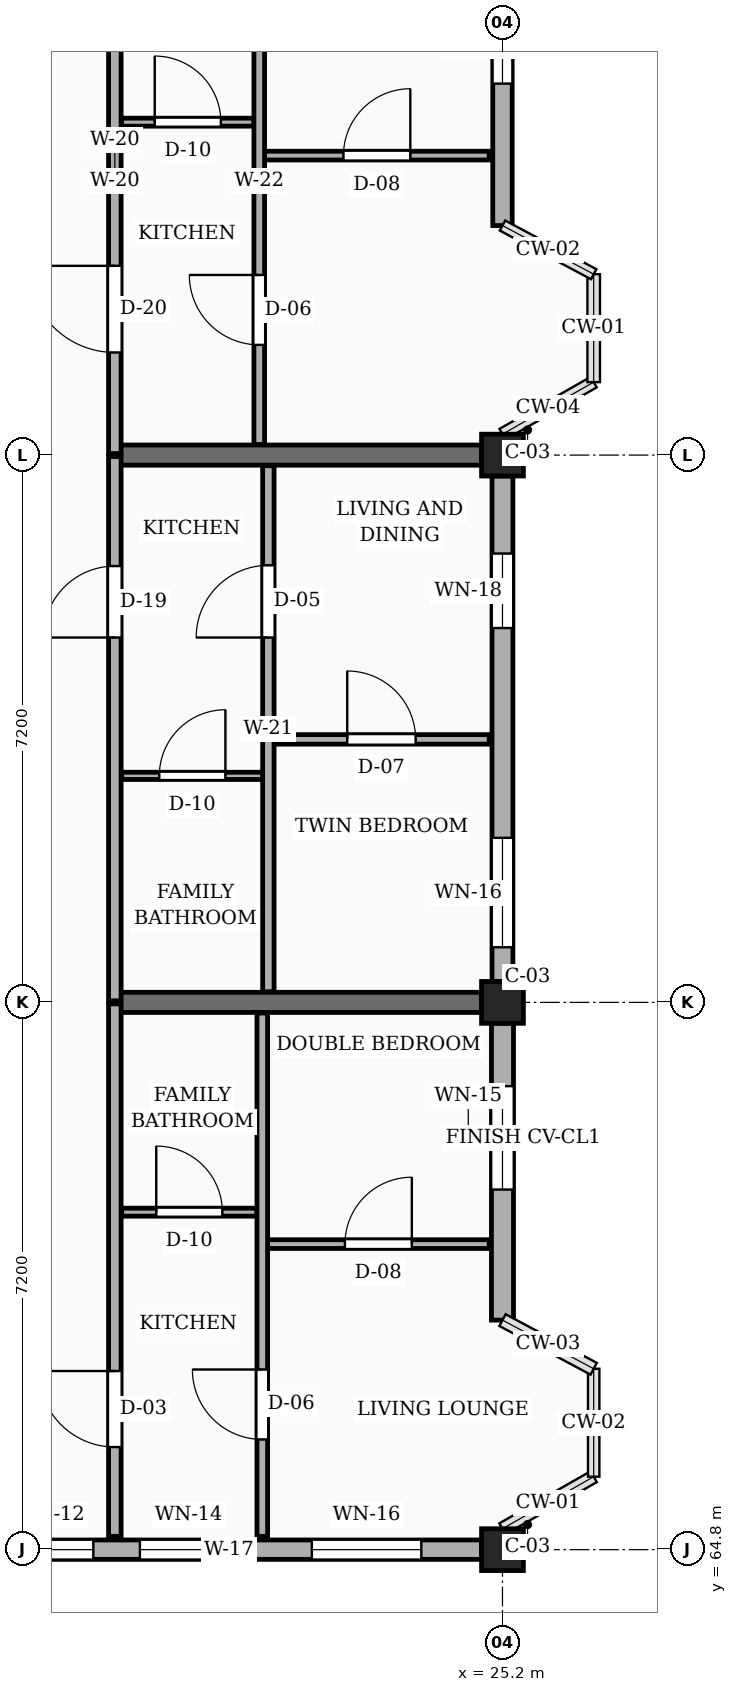
"""IFC4 building model, lengths in metres.
Left out: names, types, materials, properties, quantities, classifications, styles, units other than length and angle.
Written with IfcOpenShell. Run it as: python <this file> out.ifc"""

import sys

from ifc_helpers import new_model, si_unit, direction, frame, frame_2d, origin, origin_2d, place, context, subcontext, project, spatial, rectangle, extrude, element, fill, save


model = new_model("IFC4")
c1 = context("Model", 3, precision=1e-05, world=origin(), true_north=direction((0.0, 1.0)))
c2 = subcontext(c1, "Body", "Model", "MODEL_VIEW")
j1 = project(units=[si_unit("LENGTHUNIT", "METRE"), si_unit("PLANEANGLEUNIT", "RADIAN")], contexts=[c1])
p1 = place(None, origin())
s1 = spatial("IfcSite", under=j1, at=p1, CompositionType="ELEMENT")
p2 = place(p1, origin())
s2 = spatial("IfcBuilding", under=s1, at=p2, CompositionType="ELEMENT")
p3 = place(p2, frame((0.0, 0.0, 10.8)))
s3 = spatial("IfcBuildingStorey", under=s2, at=p3, CompositionType="ELEMENT", Elevation=10.8)
for number, where, z_axis, x_axis in (
    (1, (25.2, 64.8, 0.0), (0.0, 0.0, 1.0), (1.0, 0.0, 0.0)),
    (2, (25.2, 72.0, 0.0), (0.0, 0.0, 1.0), (1.0, 0.0, 0.0)),
    (3, (25.2, 79.2, 0.0), (0.0, 0.0, 1.0), (1.0, 0.0, 0.0)),
):
    element("IfcColumn", number, at=place(p3, frame(where, z_axis=z_axis, x_axis=x_axis)), inside=s3, PredefinedType="COLUMN", context=c2, shape_type="SweptSolid", body=[
        extrude(rectangle(XDim=0.55, YDim=0.55, at=origin_2d()), origin(), (0.0, 0.0, 1.0), 3.15),
    ])
for number, where, z_axis, x_axis in (
    (4, (20.1, 72.0, 0.0), (0.0, 0.0, 1.0), (1.0, 0.0, 0.0)),
    (5, (20.1, 79.2, 0.0), (0.0, 0.0, 1.0), (1.0, 0.0, 0.0)),
):
    element("IfcWall", number, at=place(p3, frame(where, z_axis=z_axis, x_axis=x_axis)), inside=s3, PredefinedType="SOLIDWALL", context=c2, shape_type="SweptSolid", body=[
        extrude(rectangle(XDim=4.825, YDim=0.265, at=frame_2d((2.413, 0.0))), origin(), (0.0, 0.0, 1.0), 2.21),
    ])
p4 = place(p3, frame((18.275, 64.8, 0.0), z_axis=(0.0, 0.0, 1.0), x_axis=(1.0, 0.0, 0.0)))
e6 = element("IfcWall", 6, at=p4, inside=s3, PredefinedType="SOLIDWALL", context=c2, shape_type="SweptSolid", body=[
    extrude(rectangle(XDim=6.65, YDim=0.255, at=frame_2d((3.325, 0.0))), origin(), (0.0, 0.0, 1.0), 2.48),
])
p5 = place(p4, frame((0.423, 0.0, 0.78)))
e7 = element("IfcOpeningElement", 7, at=p5, cuts=e6, PredefinedType="OPENING", context=c2, shape_type="SweptSolid", body=[
    extrude(rectangle(XDim=1.12, YDim=1.26, at=frame_2d((0.56, 0.63))), frame((0.0, 0.137, 0.0), z_axis=(0.0, -1.0, 0.0), x_axis=(1.0, 0.0, 0.0)), (0.0, 0.0, 1.0), 0.275),
])
p6 = place(p4, frame((2.155, 0.0, 0.78)))
e8 = element("IfcOpeningElement", 8, at=p6, cuts=e6, PredefinedType="OPENING", context=c2, shape_type="SweptSolid", body=[
    extrude(rectangle(XDim=1.28, YDim=1.26, at=frame_2d((0.64, 0.63))), frame((0.0, 0.137, 0.0), z_axis=(0.0, -1.0, 0.0), x_axis=(1.0, 0.0, 0.0)), (0.0, 0.0, 1.0), 0.275),
])
p7 = place(p4, frame((4.417, 0.0, 0.78)))
e9 = element("IfcOpeningElement", 9, at=p7, cuts=e6, PredefinedType="OPENING", context=c2, shape_type="SweptSolid", body=[
    extrude(rectangle(XDim=1.44, YDim=1.26, at=frame_2d((0.72, 0.63))), frame((0.0, 0.137, 0.0), z_axis=(0.0, -1.0, 0.0), x_axis=(1.0, 0.0, 0.0)), (0.0, 0.0, 1.0), 0.275),
])
p8 = place(p3, frame((25.2, 67.82, 0.0), z_axis=(0.0, 0.0, 1.0), x_axis=(0.0, 1.0, 0.0)))
e10 = element("IfcWall", 10, at=p8, inside=s3, PredefinedType="SOLIDWALL", context=c2, shape_type="SweptSolid", body=[
    extrude(rectangle(XDim=3.905, YDim=0.29, at=frame_2d((1.953, 0.0))), origin(), (0.0, 0.0, 1.0), 2.48),
])
p9 = place(p8, frame((1.718, 0.0, 0.78)))
e11 = element("IfcOpeningElement", 11, at=p9, cuts=e10, PredefinedType="OPENING", context=c2, shape_type="SweptSolid", body=[
    extrude(rectangle(XDim=1.36, YDim=1.26, at=frame_2d((0.68, 0.63))), frame((0.0, 0.155, 0.0), z_axis=(0.0, -1.0, 0.0), x_axis=(1.0, 0.0, 0.0)), (0.0, 0.0, 1.0), 0.31),
])
p10 = place(p3, frame((25.2, 72.275, 0.0), z_axis=(0.0, 0.0, 1.0), x_axis=(0.0, 1.0, 0.0)))
e12 = element("IfcWall", 12, at=p10, inside=s3, PredefinedType="SOLIDWALL", context=c2, shape_type="SweptSolid", body=[
    extrude(rectangle(XDim=6.65, YDim=0.275, at=frame_2d((3.325, 0.0))), origin(), (0.0, 0.0, 1.0), 2.48),
])
p11 = place(p10, frame((0.45, 0.0, 0.78)))
e13 = element("IfcOpeningElement", 13, at=p11, cuts=e12, PredefinedType="OPENING", context=c2, shape_type="SweptSolid", body=[
    extrude(rectangle(XDim=1.44, YDim=1.26, at=frame_2d((0.72, 0.63))), frame((0.0, 0.147, 0.0), z_axis=(0.0, -1.0, 0.0), x_axis=(1.0, 0.0, 0.0)), (0.0, 0.0, 1.0), 0.295),
])
p12 = place(p10, frame((4.65, 0.0, 0.78)))
e14 = element("IfcOpeningElement", 14, at=p12, cuts=e12, PredefinedType="OPENING", context=c2, shape_type="SweptSolid", body=[
    extrude(rectangle(XDim=0.98, YDim=1.36, at=frame_2d((0.49, 0.68))), frame((0.0, 0.147, 0.0), z_axis=(0.0, -1.0, 0.0), x_axis=(1.0, 0.0, 0.0)), (0.0, 0.0, 1.0), 0.295),
])
p13 = place(p3, frame((25.2, 82.22, 0.0), z_axis=(0.0, 0.0, 1.0), x_axis=(0.0, 1.0, 0.0)))
e15 = element("IfcWall", 15, at=p13, inside=s3, PredefinedType="SOLIDWALL", context=c2, shape_type="SweptSolid", body=[
    extrude(rectangle(XDim=3.905, YDim=0.255, at=frame_2d((1.953, 0.0))), origin(), (0.0, 0.0, 1.0), 2.48),
])
p14 = place(p13, frame((1.867, 0.0, 0.78)))
e16 = element("IfcOpeningElement", 16, at=p14, cuts=e15, PredefinedType="OPENING", context=c2, shape_type="SweptSolid", body=[
    extrude(rectangle(XDim=0.98, YDim=1.36, at=frame_2d((0.49, 0.68))), frame((0.0, 0.137, 0.0), z_axis=(0.0, -1.0, 0.0), x_axis=(1.0, 0.0, 0.0)), (0.0, 0.0, 1.0), 0.275),
])
p15 = place(p3, frame((20.1, 64.975, 0.0), z_axis=(0.0, 0.0, 1.0), x_axis=(0.0, 1.0, 0.0)))
e17 = element("IfcWall", 17, at=p15, inside=s3, PredefinedType="PARTITIONING", context=c2, shape_type="SweptSolid", body=[
    extrude(rectangle(XDim=7.005, YDim=0.165, at=frame_2d((3.502, 0.0))), origin(), (0.0, 0.0, 1.0), 2.345),
])
p16 = place(p15, frame((1.175, 0.0, 0.0)))
e18 = element("IfcOpeningElement", 18, at=p16, cuts=e17, PredefinedType="OPENING", context=c2, shape_type="SweptSolid", body=[
    extrude(rectangle(XDim=1.0, YDim=2.15, at=frame_2d((0.5, 1.075))), frame((0.0, 0.093, 0.0), z_axis=(0.0, -1.0, 0.0), x_axis=(1.0, 0.0, 0.0)), (0.0, 0.0, 1.0), 0.185),
])
p17 = place(p3, frame((20.1, 72.02, 0.0), z_axis=(0.0, 0.0, 1.0), x_axis=(0.0, 1.0, 0.0)))
e19 = element("IfcWall", 19, at=p17, inside=s3, PredefinedType="PARTITIONING", context=c2, shape_type="SweptSolid", body=[
    extrude(rectangle(XDim=7.16, YDim=0.165, at=frame_2d((3.58, 0.0))), origin(), (0.0, 0.0, 1.0), 2.345),
])
p18 = place(p17, frame((4.78, 0.0, 0.0)))
e20 = element("IfcOpeningElement", 20, at=p18, cuts=e19, PredefinedType="OPENING", context=c2, shape_type="SweptSolid", body=[
    extrude(rectangle(XDim=0.94, YDim=2.12, at=frame_2d((0.47, 1.06))), frame((0.0, 0.093, 0.0), z_axis=(0.0, -1.0, 0.0), x_axis=(1.0, 0.0, 0.0)), (0.0, 0.0, 1.0), 0.185),
])
p19 = place(p3, frame((20.1, 79.22, 0.0), z_axis=(0.0, 0.0, 1.0), x_axis=(0.0, 1.0, 0.0)))
e21 = element("IfcWall", 21, at=p19, inside=s3, PredefinedType="PARTITIONING", context=c2, shape_type="SweptSolid", body=[
    extrude(rectangle(XDim=7.16, YDim=0.165, at=frame_2d((3.58, 0.0))), origin(), (0.0, 0.0, 1.0), 2.345),
])
p20 = place(p19, frame((1.33, 0.0, 0.0)))
e22 = element("IfcOpeningElement", 22, at=p20, cuts=e21, PredefinedType="OPENING", context=c2, shape_type="SweptSolid", body=[
    extrude(rectangle(XDim=1.14, YDim=2.18, at=frame_2d((0.57, 1.09))), frame((0.0, 0.093, 0.0), z_axis=(0.0, -1.0, 0.0), x_axis=(1.0, 0.0, 0.0)), (0.0, 0.0, 1.0), 0.185),
])
p21 = place(p3, frame((22.11, 68.82, 0.0), z_axis=(0.0, 0.0, 1.0), x_axis=(1.0, 0.0, 0.0)))
e23 = element("IfcWall", 23, at=p21, inside=s3, PredefinedType="PARTITIONING", context=c2, shape_type="SweptSolid", body=[
    extrude(rectangle(XDim=2.915, YDim=0.115, at=frame_2d((1.458, 0.0))), origin(), (0.0, 0.0, 1.0), 2.345),
])
p22 = place(p21, frame((1.018, 0.0, 0.0)))
e24 = element("IfcOpeningElement", 24, at=p22, cuts=e23, PredefinedType="OPENING", context=c2, shape_type="SweptSolid", body=[
    extrude(rectangle(XDim=0.88, YDim=2.08, at=frame_2d((0.44, 1.04))), frame((0.0, 0.067, 0.0), z_axis=(0.0, -1.0, 0.0), x_axis=(1.0, 0.0, 0.0)), (0.0, 0.0, 1.0), 0.135),
])
p23 = place(p3, frame((20.19, 69.24, 0.0), z_axis=(0.0, 0.0, 1.0), x_axis=(1.0, 0.0, 0.0)))
e25 = element("IfcWall", 25, at=p23, inside=s3, PredefinedType="PARTITIONING", context=c2, shape_type="SweptSolid", body=[
    extrude(rectangle(XDim=1.78, YDim=0.105, at=frame_2d((0.89, 0.0))), origin(), (0.0, 0.0, 1.0), 2.345),
])
p24 = place(p23, frame((0.455, 0.0, 0.0)))
e26 = element("IfcOpeningElement", 26, at=p24, cuts=e25, PredefinedType="OPENING", context=c2, shape_type="SweptSolid", body=[
    extrude(rectangle(XDim=0.87, YDim=2.05, at=frame_2d((0.435, 1.025))), frame((0.0, 0.062, 0.0), z_axis=(0.0, -1.0, 0.0), x_axis=(1.0, 0.0, 0.0)), (0.0, 0.0, 1.0), 0.125),
])
p25 = place(p3, frame((22.04, 64.975, 0.0), z_axis=(0.0, 0.0, 1.0), x_axis=(0.0, 1.0, 0.0)))
e27 = element("IfcWall", 27, at=p25, inside=s3, PredefinedType="PARTITIONING", context=c2, shape_type="SweptSolid", body=[
    extrude(rectangle(XDim=6.885, YDim=0.14, at=frame_2d((3.442, 0.0))), origin(), (0.0, 0.0, 1.0), 2.345),
])
p26 = place(p25, frame((1.275, 0.0, 0.0)))
e28 = element("IfcOpeningElement", 28, at=p26, cuts=e27, PredefinedType="OPENING", context=c2, shape_type="SweptSolid", body=[
    extrude(rectangle(XDim=0.92, YDim=2.1, at=frame_2d((0.46, 1.05))), frame((0.0, 0.08, 0.0), z_axis=(0.0, -1.0, 0.0), x_axis=(1.0, 0.0, 0.0)), (0.0, 0.0, 1.0), 0.16),
])
p27 = place(p3, frame((22.19, 75.46, 0.0), z_axis=(0.0, 0.0, 1.0), x_axis=(1.0, 0.0, 0.0)))
e29 = element("IfcWall", 29, at=p27, inside=s3, PredefinedType="PARTITIONING", context=c2, shape_type="SweptSolid", body=[
    extrude(rectangle(XDim=2.835, YDim=0.125, at=frame_2d((1.417, 0.0))), origin(), (0.0, 0.0, 1.0), 2.345),
])
p28 = place(p27, frame((0.968, 0.0, 0.0)))
e30 = element("IfcOpeningElement", 30, at=p28, cuts=e29, PredefinedType="OPENING", context=c2, shape_type="SweptSolid", body=[
    extrude(rectangle(XDim=0.9, YDim=2.1, at=frame_2d((0.45, 1.05))), frame((0.0, 0.073, 0.0), z_axis=(0.0, -1.0, 0.0), x_axis=(1.0, 0.0, 0.0)), (0.0, 0.0, 1.0), 0.145),
])
p29 = place(p3, frame((20.19, 74.98, 0.0), z_axis=(0.0, 0.0, 1.0), x_axis=(1.0, 0.0, 0.0)))
e31 = element("IfcWall", 31, at=p29, inside=s3, PredefinedType="PARTITIONING", context=c2, shape_type="SweptSolid", body=[
    extrude(rectangle(XDim=1.86, YDim=0.095, at=frame_2d((0.93, 0.0))), origin(), (0.0, 0.0, 1.0), 2.345),
])
p30 = place(p29, frame((0.495, 0.0, 0.0)))
e32 = element("IfcOpeningElement", 32, at=p30, cuts=e31, PredefinedType="OPENING", context=c2, shape_type="SweptSolid", body=[
    extrude(rectangle(XDim=0.87, YDim=2.05, at=frame_2d((0.435, 1.025))), frame((0.0, 0.058, 0.0), z_axis=(0.0, -1.0, 0.0), x_axis=(1.0, 0.0, 0.0)), (0.0, 0.0, 1.0), 0.115),
])
p31 = place(p3, frame((22.12, 72.14, 0.0), z_axis=(0.0, 0.0, 1.0), x_axis=(0.0, 1.0, 0.0)))
e33 = element("IfcWall", 33, at=p31, inside=s3, PredefinedType="PARTITIONING", context=c2, shape_type="SweptSolid", body=[
    extrude(rectangle(XDim=6.92, YDim=0.15, at=frame_2d((3.46, 0.0))), origin(), (0.0, 0.0, 1.0), 2.345),
])
p32 = place(p31, frame((4.66, 0.0, 0.0)))
e34 = element("IfcOpeningElement", 34, at=p32, cuts=e33, PredefinedType="OPENING", context=c2, shape_type="SweptSolid", body=[
    extrude(rectangle(XDim=0.95, YDim=2.1, at=frame_2d((0.475, 1.05))), frame((0.0, 0.085, 0.0), z_axis=(0.0, -1.0, 0.0), x_axis=(1.0, 0.0, 0.0)), (0.0, 0.0, 1.0), 0.17),
])
p33 = place(p3, frame((22.07, 83.14, 0.0), z_axis=(0.0, 0.0, 1.0), x_axis=(1.0, 0.0, 0.0)))
e35 = element("IfcWall", 35, at=p33, inside=s3, PredefinedType="PARTITIONING", context=c2, shape_type="SweptSolid", body=[
    extrude(rectangle(XDim=2.955, YDim=0.115, at=frame_2d((1.478, 0.0))), origin(), (0.0, 0.0, 1.0), 2.345),
])
p34 = place(p33, frame((1.038, 0.0, 0.0)))
e36 = element("IfcOpeningElement", 36, at=p34, cuts=e35, PredefinedType="OPENING", context=c2, shape_type="SweptSolid", body=[
    extrude(rectangle(XDim=0.88, YDim=2.08, at=frame_2d((0.44, 1.04))), frame((0.0, 0.067, 0.0), z_axis=(0.0, -1.0, 0.0), x_axis=(1.0, 0.0, 0.0)), (0.0, 0.0, 1.0), 0.135),
])
p35 = place(p3, frame((20.19, 83.58, 0.0), z_axis=(0.0, 0.0, 1.0), x_axis=(1.0, 0.0, 0.0)))
e37 = element("IfcWall", 37, at=p35, inside=s3, PredefinedType="PARTITIONING", context=c2, shape_type="SweptSolid", body=[
    extrude(rectangle(XDim=1.74, YDim=0.105, at=frame_2d((0.87, 0.0))), origin(), (0.0, 0.0, 1.0), 2.345),
])
p36 = place(p35, frame((0.435, 0.0, 0.0)))
e38 = element("IfcOpeningElement", 38, at=p36, cuts=e37, PredefinedType="OPENING", context=c2, shape_type="SweptSolid", body=[
    extrude(rectangle(XDim=0.87, YDim=2.05, at=frame_2d((0.435, 1.025))), frame((0.0, 0.062, 0.0), z_axis=(0.0, -1.0, 0.0), x_axis=(1.0, 0.0, 0.0)), (0.0, 0.0, 1.0), 0.125),
])
p37 = place(p3, frame((22.0, 79.34, 0.0), z_axis=(0.0, 0.0, 1.0), x_axis=(0.0, 1.0, 0.0)))
e39 = element("IfcWall", 39, at=p37, inside=s3, PredefinedType="PARTITIONING", context=c2, shape_type="SweptSolid", body=[
    extrude(rectangle(XDim=6.92, YDim=0.14, at=frame_2d((3.46, 0.0))), origin(), (0.0, 0.0, 1.0), 2.345),
])
p38 = place(p37, frame((1.31, 0.0, 0.0)))
e40 = element("IfcOpeningElement", 40, at=p38, cuts=e39, PredefinedType="OPENING", context=c2, shape_type="SweptSolid", body=[
    extrude(rectangle(XDim=0.92, YDim=2.1, at=frame_2d((0.46, 1.05))), frame((0.0, 0.08, 0.0), z_axis=(0.0, -1.0, 0.0), x_axis=(1.0, 0.0, 0.0)), (0.0, 0.0, 1.0), 0.16),
])
p39 = place(p5, origin())
e41 = element("IfcWindow", 41, at=p39, inside=s3, PartitioningType="SINGLE_PANEL", PredefinedType="WINDOW", context=c2, shape_type="SweptSolid", body=[
    extrude(rectangle(XDim=1.12, YDim=1.26, at=frame_2d((0.56, 0.63))), frame((0.0, 0.03, 0.0), z_axis=(0.0, -1.0, 0.0), x_axis=(1.0, 0.0, 0.0)), (0.0, 0.0, 1.0), 0.06),
])
fill(e7, e41)
p40 = place(p6, origin())
e42 = element("IfcWindow", 42, at=p40, inside=s3, PartitioningType="SINGLE_PANEL", PredefinedType="WINDOW", context=c2, shape_type="SweptSolid", body=[
    extrude(rectangle(XDim=1.28, YDim=1.26, at=frame_2d((0.64, 0.63))), frame((0.0, 0.03, 0.0), z_axis=(0.0, -1.0, 0.0), x_axis=(1.0, 0.0, 0.0)), (0.0, 0.0, 1.0), 0.06),
])
fill(e8, e42)
p41 = place(p7, origin())
e43 = element("IfcWindow", 43, at=p41, inside=s3, PartitioningType="SINGLE_PANEL", PredefinedType="WINDOW", context=c2, shape_type="SweptSolid", body=[
    extrude(rectangle(XDim=1.44, YDim=1.26, at=frame_2d((0.72, 0.63))), frame((0.0, 0.03, 0.0), z_axis=(0.0, -1.0, 0.0), x_axis=(1.0, 0.0, 0.0)), (0.0, 0.0, 1.0), 0.06),
])
fill(e9, e43)
p42 = place(p9, origin())
e44 = element("IfcWindow", 44, at=p42, inside=s3, PartitioningType="SINGLE_PANEL", PredefinedType="WINDOW", context=c2, shape_type="SweptSolid", body=[
    extrude(rectangle(XDim=1.36, YDim=1.26, at=frame_2d((0.68, 0.63))), frame((0.0, 0.03, 0.0), z_axis=(0.0, -1.0, 0.0), x_axis=(1.0, 0.0, 0.0)), (0.0, 0.0, 1.0), 0.06),
])
fill(e11, e44)
p43 = place(p11, origin())
e45 = element("IfcWindow", 45, at=p43, inside=s3, PartitioningType="SINGLE_PANEL", PredefinedType="WINDOW", context=c2, shape_type="SweptSolid", body=[
    extrude(rectangle(XDim=1.44, YDim=1.26, at=frame_2d((0.72, 0.63))), frame((0.0, 0.03, 0.0), z_axis=(0.0, -1.0, 0.0), x_axis=(1.0, 0.0, 0.0)), (0.0, 0.0, 1.0), 0.06),
])
fill(e13, e45)
p44 = place(p12, origin())
e46 = element("IfcWindow", 46, at=p44, inside=s3, PartitioningType="SINGLE_PANEL", PredefinedType="WINDOW", context=c2, shape_type="SweptSolid", body=[
    extrude(rectangle(XDim=0.98, YDim=1.36, at=frame_2d((0.49, 0.68))), frame((0.0, 0.03, 0.0), z_axis=(0.0, -1.0, 0.0), x_axis=(1.0, 0.0, 0.0)), (0.0, 0.0, 1.0), 0.06),
])
fill(e14, e46)
p45 = place(p14, origin())
e47 = element("IfcWindow", 47, at=p45, inside=s3, PartitioningType="SINGLE_PANEL", PredefinedType="WINDOW", context=c2, shape_type="SweptSolid", body=[
    extrude(rectangle(XDim=0.98, YDim=1.36, at=frame_2d((0.49, 0.68))), frame((0.0, 0.03, 0.0), z_axis=(0.0, -1.0, 0.0), x_axis=(1.0, 0.0, 0.0)), (0.0, 0.0, 1.0), 0.06),
])
fill(e16, e47)
p46 = place(p16, origin())
e48 = element("IfcDoor", 48, at=p46, inside=s3, OperationType="SINGLE_SWING_RIGHT", PredefinedType="DOOR", context=c2, shape_type="SweptSolid", body=[
    extrude(rectangle(XDim=1.0, YDim=2.15, at=frame_2d((0.5, 1.075))), frame((0.0, 0.025, 0.0), z_axis=(0.0, -1.0, 0.0), x_axis=(1.0, 0.0, 0.0)), (0.0, 0.0, 1.0), 0.05),
])
fill(e18, e48)
p47 = place(p18, origin())
e49 = element("IfcDoor", 49, at=p47, inside=s3, OperationType="SINGLE_SWING_LEFT", PredefinedType="DOOR", context=c2, shape_type="SweptSolid", body=[
    extrude(rectangle(XDim=0.94, YDim=2.12, at=frame_2d((0.47, 1.06))), frame((0.0, 0.025, 0.0), z_axis=(0.0, -1.0, 0.0), x_axis=(1.0, 0.0, 0.0)), (0.0, 0.0, 1.0), 0.05),
])
fill(e20, e49)
p48 = place(p20, origin())
e50 = element("IfcDoor", 50, at=p48, inside=s3, OperationType="SINGLE_SWING_RIGHT", PredefinedType="DOOR", context=c2, shape_type="SweptSolid", body=[
    extrude(rectangle(XDim=1.14, YDim=2.18, at=frame_2d((0.57, 1.09))), frame((0.0, 0.025, 0.0), z_axis=(0.0, -1.0, 0.0), x_axis=(1.0, 0.0, 0.0)), (0.0, 0.0, 1.0), 0.05),
])
fill(e22, e50)
p49 = place(p22, origin())
e51 = element("IfcDoor", 51, at=p49, inside=s3, OperationType="SINGLE_SWING_RIGHT", PredefinedType="DOOR", context=c2, shape_type="SweptSolid", body=[
    extrude(rectangle(XDim=0.88, YDim=2.08, at=frame_2d((0.44, 1.04))), frame((0.0, 0.025, 0.0), z_axis=(0.0, -1.0, 0.0), x_axis=(1.0, 0.0, 0.0)), (0.0, 0.0, 1.0), 0.05),
])
fill(e24, e51)
p50 = place(p24, origin())
e52 = element("IfcDoor", 52, at=p50, inside=s3, OperationType="SINGLE_SWING_LEFT", PredefinedType="DOOR", context=c2, shape_type="SweptSolid", body=[
    extrude(rectangle(XDim=0.87, YDim=2.05, at=frame_2d((0.435, 1.025))), frame((0.0, 0.025, 0.0), z_axis=(0.0, -1.0, 0.0), x_axis=(1.0, 0.0, 0.0)), (0.0, 0.0, 1.0), 0.05),
])
fill(e26, e52)
p51 = place(p26, origin())
e53 = element("IfcDoor", 53, at=p51, inside=s3, OperationType="SINGLE_SWING_RIGHT", PredefinedType="DOOR", context=c2, shape_type="SweptSolid", body=[
    extrude(rectangle(XDim=0.92, YDim=2.1, at=frame_2d((0.46, 1.05))), frame((0.0, 0.025, 0.0), z_axis=(0.0, -1.0, 0.0), x_axis=(1.0, 0.0, 0.0)), (0.0, 0.0, 1.0), 0.05),
])
fill(e28, e53)
p52 = place(p28, origin())
e54 = element("IfcDoor", 54, at=p52, inside=s3, OperationType="SINGLE_SWING_LEFT", PredefinedType="DOOR", context=c2, shape_type="SweptSolid", body=[
    extrude(rectangle(XDim=0.9, YDim=2.1, at=frame_2d((0.45, 1.05))), frame((0.0, 0.025, 0.0), z_axis=(0.0, -1.0, 0.0), x_axis=(1.0, 0.0, 0.0)), (0.0, 0.0, 1.0), 0.05),
])
fill(e30, e54)
p53 = place(p30, origin())
e55 = element("IfcDoor", 55, at=p53, inside=s3, OperationType="SINGLE_SWING_RIGHT", PredefinedType="DOOR", context=c2, shape_type="SweptSolid", body=[
    extrude(rectangle(XDim=0.87, YDim=2.05, at=frame_2d((0.435, 1.025))), frame((0.0, 0.025, 0.0), z_axis=(0.0, -1.0, 0.0), x_axis=(1.0, 0.0, 0.0)), (0.0, 0.0, 1.0), 0.05),
])
fill(e32, e55)
p54 = place(p32, origin())
e56 = element("IfcDoor", 56, at=p54, inside=s3, OperationType="SINGLE_SWING_LEFT", PredefinedType="DOOR", context=c2, shape_type="SweptSolid", body=[
    extrude(rectangle(XDim=0.95, YDim=2.1, at=frame_2d((0.475, 1.05))), frame((0.0, 0.025, 0.0), z_axis=(0.0, -1.0, 0.0), x_axis=(1.0, 0.0, 0.0)), (0.0, 0.0, 1.0), 0.05),
])
fill(e34, e56)
p55 = place(p34, origin())
e57 = element("IfcDoor", 57, at=p55, inside=s3, OperationType="SINGLE_SWING_RIGHT", PredefinedType="DOOR", context=c2, shape_type="SweptSolid", body=[
    extrude(rectangle(XDim=0.88, YDim=2.08, at=frame_2d((0.44, 1.04))), frame((0.0, 0.025, 0.0), z_axis=(0.0, -1.0, 0.0), x_axis=(1.0, 0.0, 0.0)), (0.0, 0.0, 1.0), 0.05),
])
fill(e36, e57)
p56 = place(p36, origin())
e58 = element("IfcDoor", 58, at=p56, inside=s3, OperationType="SINGLE_SWING_LEFT", PredefinedType="DOOR", context=c2, shape_type="SweptSolid", body=[
    extrude(rectangle(XDim=0.87, YDim=2.05, at=frame_2d((0.435, 1.025))), frame((0.0, 0.025, 0.0), z_axis=(0.0, -1.0, 0.0), x_axis=(1.0, 0.0, 0.0)), (0.0, 0.0, 1.0), 0.05),
])
fill(e38, e58)
p57 = place(p38, origin())
e59 = element("IfcDoor", 59, at=p57, inside=s3, OperationType="SINGLE_SWING_RIGHT", PredefinedType="DOOR", context=c2, shape_type="SweptSolid", body=[
    extrude(rectangle(XDim=0.92, YDim=2.1, at=frame_2d((0.46, 1.05))), frame((0.0, 0.025, 0.0), z_axis=(0.0, -1.0, 0.0), x_axis=(1.0, 0.0, 0.0)), (0.0, 0.0, 1.0), 0.05),
])
fill(e40, e59)
save(model, sys.argv[1])
